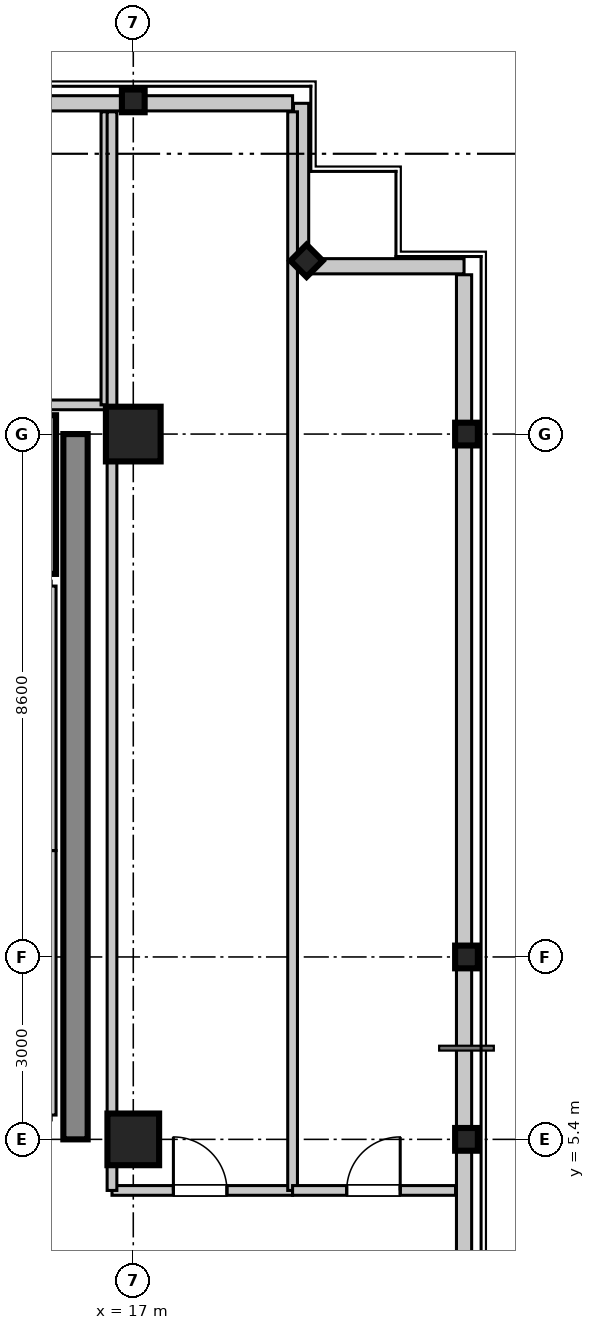
"""IFC4 building model, lengths in metres.
Left out: names, types, materials, properties, quantities, classifications, styles, units other than length and angle.
Written with IfcOpenShell. Run it as: python <this file> out.ifc"""

import sys

from ifc_helpers import new_model, si_unit, direction, frame, frame_2d, origin, origin_2d, place, context, subcontext, project, spatial, rectangle, i_section, extrude, source, transform, mapped, element, fill, save


model = new_model("IFC4")
c1 = context("Model", 3, precision=1e-05, world=origin(), true_north=direction((0.0, 1.0)))
c2 = subcontext(c1, "Body", "Model", "MODEL_VIEW")
j1 = project(units=[si_unit("LENGTHUNIT", "METRE"), si_unit("PLANEANGLEUNIT", "RADIAN")], contexts=[c1])
p1 = place(None, origin())
s1 = spatial("IfcSite", under=j1, at=p1, CompositionType="ELEMENT")
p2 = place(p1, origin())
s2 = spatial("IfcBuilding", under=s1, at=p2, CompositionType="ELEMENT")
p3 = place(p2, frame((0.0, 0.0, 300.35)))
s3 = spatial("IfcBuildingStorey", under=s2, at=p3, CompositionType="ELEMENT", Elevation=300.35)
m1 = source(origin(), c2, "Body", "SweptSolid", [
    extrude(rectangle(XDim=0.85, YDim=0.85, at=origin_2d()), origin(), (0.0, 0.0, 1.0), 3.805),
])
p4 = place(p3, frame((17.0, 5.4, 0.0), z_axis=(0.0, 0.0, 1.0), x_axis=(1.0, 0.0, 0.0)))
e1 = element("IfcColumn", 1, at=p4, inside=s3, PredefinedType="PILASTER", context=c2, shape_type="MappedRepresentation", body=[
    mapped(m1, transform((0.0, 0.0, 0.0), scale=1.0)),
])
m2 = source(origin(), c2, "Body", "SweptSolid", [
    extrude(rectangle(XDim=0.9, YDim=0.9, at=origin_2d()), origin(), (0.0, 0.0, 1.0), 3.805),
])
p5 = place(p3, frame((17.0, 17.0, 0.0), z_axis=(0.0, 0.0, 1.0), x_axis=(1.0, 0.0, 0.0)))
e2 = element("IfcColumn", 2, at=p5, inside=s3, PredefinedType="COLUMN", context=c2, shape_type="MappedRepresentation", body=[
    mapped(m2, transform((0.0, 0.0, 0.0), scale=1.0)),
])
m3 = source(origin(), c2, "Body", "SweptSolid", [
    extrude(i_section(OverallWidth=0.374, OverallDepth=0.374, WebThickness=0.014, FlangeThickness=0.023, at=origin_2d()), origin(), (0.0, 0.0, 1.0), 3.805),
])
for number, where, z_axis, x_axis in (
    (3, (22.48, 5.4, 0.0), (0.0, 0.0, 1.0), (1.0, 0.0, 0.0)),
    (4, (22.48, 8.4, 0.0), (0.0, 0.0, 1.0), (1.0, 0.0, 0.0)),
    (5, (22.48, 17.0, 0.0), (0.0, 0.0, 1.0), (1.0, 0.0, 0.0)),
    (6, (17.0, 22.48, 0.0), (0.0, 0.0, 1.0), (0.0, 1.0, 0.0)),
    (7, (19.85, 19.85, 0.0), (0.0, 0.0, 1.0), (0.707, 0.707, 0.0)),
):
    element("IfcColumn", number, at=place(p3, frame(where, z_axis=z_axis, x_axis=x_axis)), inside=s3, PredefinedType="COLUMN", context=c2, shape_type="MappedRepresentation", body=[
        mapped(m3, transform((0.0, 0.0, 0.0), scale=1.0)),
    ])
m4 = source(origin(), c2, "Body", "SweptSolid", [
    extrude(rectangle(XDim=11.6, YDim=0.4, at=frame_2d((5.8, 0.0))), origin(), (0.0, 0.0, 1.0), 3.55),
])
p6 = place(p3, frame((16.05, 5.4, 0.0), z_axis=(0.0, 0.0, 1.0), x_axis=(0.0, 1.0, 0.0)))
e8 = element("IfcWall", 8, at=p6, inside=s3, PredefinedType="SHEAR", context=c2, shape_type="MappedRepresentation", body=[
    mapped(m4, transform((0.0, 0.0, 0.0), scale=1.0)),
])
m5 = source(origin(), c2, "Body", "SweptSolid", [
    extrude(rectangle(XDim=2.61, YDim=0.22, at=frame_2d((1.305, 0.0))), origin(), (0.0, 0.0, 1.0), 3.55),
])
p7 = place(p3, frame((15.62, 14.7, 0.0), z_axis=(0.0, 0.0, 1.0), x_axis=(0.0, 1.0, 0.0)))
e9 = element("IfcWall", 9, at=p7, inside=s3, PredefinedType="SHEAR", context=c2, shape_type="MappedRepresentation", body=[
    mapped(m5, transform((0.0, 0.0, 0.0), scale=1.0)),
])
m6 = source(origin(), c2, "Body", "SweptSolid", [
    extrude(rectangle(XDim=16.0, YDim=0.25, at=frame_2d((8.0, 0.0))), origin(), (0.0, 0.0, 1.0), 2.89),
])
p8 = place(p3, frame((3.62, 22.44, 0.0), z_axis=(0.0, 0.0, 1.0), x_axis=(1.0, 0.0, 0.0)))
e10 = element("IfcWall", 10, at=p8, inside=s3, PredefinedType="STANDARD", context=c2, shape_type="MappedRepresentation", body=[
    mapped(m6, transform((0.0, 0.0, 0.0), scale=1.0)),
])
m7 = source(origin(), c2, "Body", "SweptSolid", [
    extrude(rectangle(XDim=2.54, YDim=0.25, at=frame_2d((1.27, 0.0))), origin(), (0.0, 0.0, 1.0), 2.89),
])
for number, where, z_axis, x_axis in (
    (11, (19.76, 19.9, 0.0), (0.0, 0.0, 1.0), (0.0, 1.0, 0.0)),
    (12, (19.9, 19.76, 0.0), (0.0, 0.0, 1.0), (1.0, 0.0, 0.0)),
):
    element("IfcWall", number, at=place(p3, frame(where, z_axis=z_axis, x_axis=x_axis)), inside=s3, PredefinedType="STANDARD", context=c2, shape_type="MappedRepresentation", body=[
        mapped(m7, transform((0.0, 0.0, 0.0), scale=1.0)),
    ])
m8 = source(origin(), c2, "Body", "SweptSolid", [
    extrude(rectangle(XDim=16.12, YDim=0.25, at=frame_2d((8.06, 0.0))), origin(), (0.0, 0.0, 1.0), 2.89),
])
p9 = place(p3, frame((22.44, 3.5, 0.0), z_axis=(0.0, 0.0, 1.0), x_axis=(0.0, 1.0, 0.0)))
e13 = element("IfcWall", 13, at=p9, inside=s3, PredefinedType="STANDARD", context=c2, shape_type="MappedRepresentation", body=[
    mapped(m8, transform((0.0, 0.0, 0.0), scale=1.0)),
])
m9 = source(origin(), c2, "Body", "SweptSolid", [
    extrude(rectangle(XDim=4.35, YDim=0.16, at=frame_2d((2.175, 0.0))), origin(), (0.0, 0.0, 1.0), 2.89),
])
p10 = place(p3, frame((15.65, 5.8, 0.0), z_axis=(0.0, 0.0, 1.0), x_axis=(0.0, 1.0, 0.0)))
e14 = element("IfcWall", 14, at=p10, inside=s3, PredefinedType="PARTITIONING", context=c2, shape_type="MappedRepresentation", body=[
    mapped(m9, transform((0.0, 0.0, 0.0), scale=1.0)),
])
m10 = source(origin(), c2, "Body", "SweptSolid", [
    extrude(rectangle(XDim=4.35, YDim=0.16, at=frame_2d((2.175, 0.0))), origin(), (0.0, 0.0, 1.0), 2.89),
])
p11 = place(p3, frame((15.65, 10.15, 0.0), z_axis=(0.0, 0.0, 1.0), x_axis=(0.0, 1.0, 0.0)))
e15 = element("IfcWall", 15, at=p11, inside=s3, PredefinedType="PARTITIONING", context=c2, shape_type="MappedRepresentation", body=[
    mapped(m10, transform((0.0, 0.0, 0.0), scale=1.0)),
])
m11 = source(origin(), c2, "Body", "SweptSolid", [
    extrude(rectangle(XDim=2.99, YDim=0.16, at=frame_2d((1.495, 0.0))), origin(), (0.0, 0.0, 1.0), 2.89),
])
p12 = place(p3, frame((13.56, 17.48, 0.0), z_axis=(0.0, 0.0, 1.0), x_axis=(1.0, 0.0, 0.0)))
e16 = element("IfcWall", 16, at=p12, inside=s3, PredefinedType="PARTITIONING", context=c2, shape_type="MappedRepresentation", body=[
    mapped(m11, transform((0.0, 0.0, 0.0), scale=1.0)),
])
m12 = source(origin(), c2, "Body", "SweptSolid", [
    extrude(rectangle(XDim=4.82, YDim=0.16, at=frame_2d((2.41, 0.0))), origin(), (0.0, 0.0, 1.0), 2.89),
])
p13 = place(p3, frame((16.55, 17.48, 0.0), z_axis=(0.0, 0.0, 1.0), x_axis=(0.0, 1.0, 0.0)))
e17 = element("IfcWall", 17, at=p13, inside=s3, PredefinedType="PARTITIONING", context=c2, shape_type="MappedRepresentation", body=[
    mapped(m12, transform((0.0, 0.0, 0.0), scale=1.0)),
])
m13 = source(origin(), c2, "Body", "SweptSolid", [
    extrude(rectangle(XDim=2.97, YDim=0.16, at=frame_2d((1.485, 0.0))), origin(), (0.0, 0.0, 1.0), 2.89),
])
p14 = place(p3, frame((16.65, 4.56, 0.0), z_axis=(0.0, 0.0, 1.0), x_axis=(1.0, 0.0, 0.0)))
e18 = element("IfcWall", 18, at=p14, inside=s3, PredefinedType="PARTITIONING", context=c2, shape_type="MappedRepresentation", body=[
    mapped(m13, transform((0.0, 0.0, 0.0), scale=1.0)),
])
p15 = place(p14, frame((1.01, 0.0, 0.0)))
e19 = element("IfcOpeningElement", 19, at=p15, cuts=e18, PredefinedType="OPENING", context=c2, shape_type="SweptSolid", body=[
    extrude(rectangle(XDim=0.88, YDim=2.1, at=frame_2d((0.44, 1.05))), frame((0.0, 0.09, 0.0), z_axis=(0.0, -1.0, 0.0), x_axis=(1.0, 0.0, 0.0)), (0.0, 0.0, 1.0), 0.18),
])
m14 = source(origin(), c2, "Body", "SweptSolid", [
    extrude(rectangle(XDim=17.74, YDim=0.16, at=frame_2d((8.87, 0.0))), origin(), (0.0, 0.0, 1.0), 2.89),
])
for number, where, z_axis, x_axis in (
    (20, (16.65, 4.56, 0.0), (0.0, 0.0, 1.0), (0.0, 1.0, 0.0)),
    (21, (19.62, 4.56, 0.0), (0.0, 0.0, 1.0), (0.0, 1.0, 0.0)),
):
    element("IfcWall", number, at=place(p3, frame(where, z_axis=z_axis, x_axis=x_axis)), inside=s3, PredefinedType="PARTITIONING", context=c2, shape_type="MappedRepresentation", body=[
        mapped(m14, transform((0.0, 0.0, 0.0), scale=1.0)),
    ])
m15 = source(origin(), c2, "Body", "SweptSolid", [
    extrude(rectangle(XDim=2.68, YDim=0.16, at=frame_2d((1.34, 0.0))), origin(), (0.0, 0.0, 1.0), 2.89),
])
p16 = place(p3, frame((19.62, 4.56, 0.0), z_axis=(0.0, 0.0, 1.0), x_axis=(1.0, 0.0, 0.0)))
e22 = element("IfcWall", 22, at=p16, inside=s3, PredefinedType="PARTITIONING", context=c2, shape_type="MappedRepresentation", body=[
    mapped(m15, transform((0.0, 0.0, 0.0), scale=1.0)),
])
p17 = place(p16, frame((0.89, 0.0, 0.0)))
e23 = element("IfcOpeningElement", 23, at=p17, cuts=e22, PredefinedType="OPENING", context=c2, shape_type="SweptSolid", body=[
    extrude(rectangle(XDim=0.88, YDim=2.1, at=frame_2d((0.44, 1.05))), frame((0.0, 0.09, 0.0), z_axis=(0.0, -1.0, 0.0), x_axis=(1.0, 0.0, 0.0)), (0.0, 0.0, 1.0), 0.18),
])
m16 = source(origin(), c2, "Body", "SweptSolid", [
    extrude(rectangle(XDim=0.88, YDim=2.1, at=frame_2d((0.44, 1.05))), frame((0.0, 0.025, 0.0), z_axis=(0.0, -1.0, 0.0), x_axis=(1.0, 0.0, 0.0)), (0.0, 0.0, 1.0), 0.05),
])
p18 = place(p15, origin())
e24 = element("IfcDoor", 24, at=p18, inside=s3, OperationType="SINGLE_SWING_LEFT", PredefinedType="DOOR", context=c2, shape_type="MappedRepresentation", body=[
    mapped(m16, transform((0.0, 0.0, 0.0), scale=1.0)),
])
fill(e19, e24)
p19 = place(p17, origin())
e25 = element("IfcDoor", 25, at=p19, inside=s3, OperationType="SINGLE_SWING_RIGHT", PredefinedType="DOOR", context=c2, shape_type="MappedRepresentation", body=[
    mapped(m16, transform((0.0, 0.0, 0.0), scale=1.0)),
])
fill(e23, e25)
save(model, sys.argv[1])
